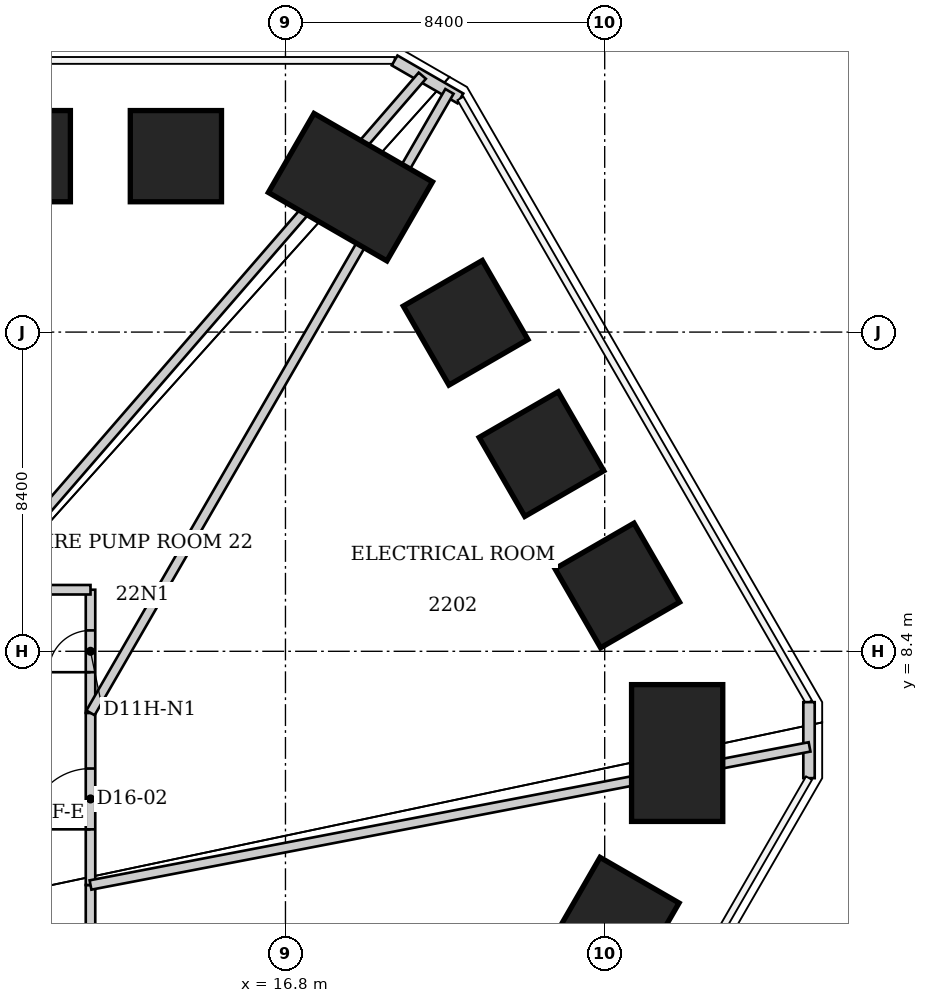
"""IFC4 building model, lengths in metres.
Left out: names, types, materials, properties, quantities, classifications, styles, units other than length and angle.
Written with IfcOpenShell. Run it as: python <this file> out.ifc"""

import sys

from ifc_helpers import new_model, si_unit, direction, frame, frame_2d, origin, origin_2d, place, context, subcontext, project, spatial, rectangle, extrude, element, fill, save


model = new_model("IFC4")
c1 = context("Model", 3, precision=1e-05, world=origin(), true_north=direction((0.0, 1.0)))
c2 = subcontext(c1, "Body", "Model", "MODEL_VIEW")
j1 = project(units=[si_unit("LENGTHUNIT", "METRE"), si_unit("PLANEANGLEUNIT", "RADIAN")], contexts=[c1])
p1 = place(None, origin())
s1 = spatial("IfcSite", under=j1, at=p1, CompositionType="ELEMENT")
p2 = place(p1, origin())
s2 = spatial("IfcBuilding", under=s1, at=p2, CompositionType="ELEMENT")
p3 = place(p2, frame((0.0, 0.0, 91.4)))
s3 = spatial("IfcBuildingStorey", under=s2, at=p3, CompositionType="ELEMENT", Elevation=91.4)
p4 = place(p3, frame((9.941, 21.43, 0.0), z_axis=(-0.017053044126, -0.036712049419, 0.999180373663), x_axis=(-0.000107778758, 0.999325751027, 0.036715551434)))
e1 = element("IfcColumn", 1, at=p4, inside=s3, PredefinedType="COLUMN", context=c2, shape_type="SweptSolid", body=[
    extrude(rectangle(XDim=2.4, YDim=2.4, at=origin_2d()), origin(), (0.0, 0.0, 1.0), 5.34),
])
p5 = place(p3, frame((13.917, 21.429, 0.0), z_axis=(-0.023853224026, -0.036672615058, 0.999042613209), x_axis=(-0.000167266676, 0.999327082748, 0.036679063624)))
e2 = element("IfcColumn", 2, at=p5, inside=s3, PredefinedType="COLUMN", context=c2, shape_type="SweptSolid", body=[
    extrude(rectangle(XDim=2.4, YDim=2.4, at=origin_2d()), origin(), (0.0, 0.0, 1.0), 5.333),
])
p6 = place(p3, frame((18.51, 20.614, 0.0), z_axis=(-0.031958260151, -0.035575312517, 0.998855878867), x_axis=(0.499237083594, 0.865201253746, 0.046788084823)))
e3 = element("IfcColumn", 3, at=p6, inside=s3, PredefinedType="COLUMN", context=c2, shape_type="SweptSolid", body=[
    extrude(rectangle(XDim=2.4, YDim=3.6, at=origin_2d()), origin(), (0.0, 0.0, 1.0), 5.332),
])
p7 = place(p3, frame((21.541, 17.045, 0.0), z_axis=(-0.036328704694, -0.028788784852, 0.998925137877), x_axis=(0.864915731471, 0.499817631807, 0.045859703319)))
e4 = element("IfcColumn", 4, at=p7, inside=s3, PredefinedType="COLUMN", context=c2, shape_type="SweptSolid", body=[
    extrude(rectangle(XDim=2.4, YDim=2.4, at=origin_2d()), origin(), (0.0, 0.0, 1.0), 5.343),
])
p8 = place(p3, frame((23.537, 13.589, 0.0), z_axis=(-0.039742486504, -0.022951171885, 0.998946334132), x_axis=(0.86505788595, 0.499568446192, 0.045893589143)))
e5 = element("IfcColumn", 5, at=p8, inside=s3, PredefinedType="COLUMN", context=c2, shape_type="SweptSolid", body=[
    extrude(rectangle(XDim=2.4, YDim=2.4, at=origin_2d()), origin(), (0.0, 0.0, 1.0), 5.351),
])
p9 = place(p3, frame((25.532, 10.132, 0.0), z_axis=(-0.043137386798, -0.017090447735, 0.998922961222), x_axis=(0.865241244978, 0.499249655961, 0.045906089048)))
e6 = element("IfcColumn", 6, at=p9, inside=s3, PredefinedType="COLUMN", context=c2, shape_type="SweptSolid", body=[
    extrude(rectangle(XDim=2.4, YDim=2.4, at=origin_2d()), origin(), (0.0, 0.0, 1.0), 5.343),
])
p10 = place(p3, frame((27.107, 5.723, 0.0), z_axis=(-0.046838428315, -0.009889638823, 0.998853521132), x_axis=(0.99890247848, -0.000452744235, 0.046836241416)))
e7 = element("IfcColumn", 7, at=p10, inside=s3, PredefinedType="COLUMN", context=c2, shape_type="SweptSolid", body=[
    extrude(rectangle(XDim=2.4, YDim=3.6, at=origin_2d()), origin(), (0.0, 0.0, 1.0), 5.332),
])
p11 = place(p3, frame((25.517, 1.338, 0.0), z_axis=(-0.043723212167, -0.002289173412, 0.999041060419), x_axis=(0.864969947422, -0.500479225702, 0.036708782297)))
e8 = element("IfcColumn", 8, at=p11, inside=s3, PredefinedType="COLUMN", context=c2, shape_type="SweptSolid", body=[
    extrude(rectangle(XDim=2.4, YDim=2.4, at=origin_2d()), origin(), (0.0, 0.0, 1.0), 5.333),
])
for number, where, z_axis, x_axis in (
    (9, (19.672, 23.949, 0.0), (0.0, 0.0, 1.0), (0.866, -0.5, 0.0)),
    (10, (30.576, 7.062, 0.0), (0.0, 0.0, 1.0), (0.0, -1.0, 0.0)),
):
    element("IfcWall", number, at=place(p3, frame(where, z_axis=z_axis, x_axis=x_axis)), inside=s3, PredefinedType="SOLIDWALL", context=c2, shape_type="SweptSolid", body=[
        extrude(rectangle(XDim=2.0, YDim=0.3, at=frame_2d((1.0, 0.0))), origin(), (0.0, 0.0, 1.0), 5.24),
    ])
p12 = place(p3, frame((11.67, -13.12, 0.0), z_axis=(0.0, 0.0, 1.0), x_axis=(0.0, 1.0, 0.0)))
e11 = element("IfcWall", 11, at=p12, inside=s3, PredefinedType="PARTITIONING", context=c2, shape_type="SweptSolid", body=[
    extrude(rectangle(XDim=15.37, YDim=0.25, at=frame_2d((7.685, 0.0))), origin(), (0.0, 0.0, 1.0), 5.24),
])
p13 = place(p12, frame((6.885, 0.0, 0.0)))
e12 = element("IfcOpeningElement", 12, at=p13, cuts=e11, PredefinedType="OPENING", context=c2, shape_type="SweptSolid", body=[
    extrude(rectangle(XDim=1.6, YDim=2.4, at=frame_2d((0.8, 1.2))), frame((0.0, 0.125, 0.0), z_axis=(0.0, -1.0, 0.0), x_axis=(1.0, 0.0, 0.0)), (0.0, 0.0, 1.0), 0.25),
])
p14 = place(p3, frame((11.67, 2.25, 0.0), z_axis=(0.0, 0.0, 1.0), x_axis=(0.0, 1.0, 0.0)))
e13 = element("IfcWall", 13, at=p14, inside=s3, PredefinedType="PARTITIONING", context=c2, shape_type="SweptSolid", body=[
    extrude(rectangle(XDim=4.53, YDim=0.25, at=frame_2d((2.265, 0.0))), origin(), (0.0, 0.0, 1.0), 5.24),
])
p15 = place(p14, frame((1.465, 0.0, 0.0)))
e14 = element("IfcOpeningElement", 14, at=p15, cuts=e13, PredefinedType="OPENING", context=c2, shape_type="SweptSolid", body=[
    extrude(rectangle(XDim=1.6, YDim=2.4, at=frame_2d((0.8, 1.2))), frame((0.0, 0.125, 0.0), z_axis=(0.0, -1.0, 0.0), x_axis=(1.0, 0.0, 0.0)), (0.0, 0.0, 1.0), 0.25),
])
p16 = place(p3, frame((11.67, 6.78, 0.0), z_axis=(0.0, 0.0, 1.0), x_axis=(0.0, 1.0, 0.0)))
e15 = element("IfcWall", 15, at=p16, inside=s3, PredefinedType="PARTITIONING", context=c2, shape_type="SweptSolid", body=[
    extrude(rectangle(XDim=3.24, YDim=0.25, at=frame_2d((1.62, 0.0))), origin(), (0.0, 0.0, 1.0), 5.24),
])
p17 = place(p16, frame((1.07, 0.0, 0.0)))
e16 = element("IfcOpeningElement", 16, at=p17, cuts=e15, PredefinedType="OPENING", context=c2, shape_type="SweptSolid", body=[
    extrude(rectangle(XDim=1.1, YDim=2.2, at=frame_2d((0.55, 1.1))), frame((0.0, 0.125, 0.0), z_axis=(0.0, -1.0, 0.0), x_axis=(1.0, 0.0, 0.0)), (0.0, 0.0, 1.0), 0.25),
])
p18 = place(p3, frame((11.67, 6.78, 0.0), z_axis=(0.0, 0.0, 1.0), x_axis=(0.500122303093, 0.865954780545, 0.0)))
e17 = element("IfcWall", 17, at=p18, inside=s3, PredefinedType="PARTITIONING", context=c2, shape_type="SweptSolid", body=[
    extrude(rectangle(XDim=18.885, YDim=0.25, at=frame_2d((9.443, 0.0))), origin(), (0.0, 0.0, 1.0), 5.2),
])
p19 = place(p3, frame((11.67, 10.02, 0.0), z_axis=(0.0, 0.0, 1.0), x_axis=(-1.0, 0.0, 0.0)))
e18 = element("IfcWall", 18, at=p19, inside=s3, PredefinedType="PARTITIONING", context=c2, shape_type="SweptSolid", body=[
    extrude(rectangle(XDim=2.99, YDim=0.25, at=frame_2d((1.495, 0.0))), origin(), (0.0, 0.0, 1.0), 5.24),
])
p20 = place(p3, frame((20.4, 23.547, 0.0), z_axis=(0.0, 0.0, 1.0), x_axis=(-0.654827191867, -0.755778637427, 0.0)))
e19 = element("IfcWall", 19, at=p20, inside=s3, PredefinedType="PARTITIONING", context=c2, shape_type="SweptSolid", body=[
    extrude(rectangle(XDim=17.898, YDim=0.25, at=frame_2d((8.949, 0.0))), origin(), (0.0, 0.0, 1.0), 5.2),
])
p21 = place(p3, frame((30.591, 5.884, 0.0), z_axis=(0.0, 0.0, 1.0), x_axis=(-0.982047909255, -0.188631662049, 0.0)))
e20 = element("IfcWall", 20, at=p21, inside=s3, PredefinedType="PARTITIONING", context=c2, shape_type="SweptSolid", body=[
    extrude(rectangle(XDim=19.267, YDim=0.25, at=frame_2d((9.633, 0.0))), origin(), (0.0, 0.0, 1.0), 4.275),
])
p22 = place(p15, origin())
e21 = element("IfcDoor", 21, at=p22, inside=s3, OperationType="DOUBLE_DOOR_SINGLE_SWING", PredefinedType="DOOR", context=c2, shape_type="SweptSolid", body=[
    extrude(rectangle(XDim=1.6, YDim=2.4, at=frame_2d((0.8, 1.2))), frame((0.0, 0.025, 0.0), z_axis=(0.0, -1.0, 0.0), x_axis=(1.0, 0.0, 0.0)), (0.0, 0.0, 1.0), 0.05),
])
fill(e14, e21)
p23 = place(p17, origin())
e22 = element("IfcDoor", 22, at=p23, inside=s3, OperationType="SINGLE_SWING_LEFT", PredefinedType="DOOR", context=c2, shape_type="SweptSolid", body=[
    extrude(rectangle(XDim=1.1, YDim=2.2, at=frame_2d((0.55, 1.1))), frame((0.0, 0.025, 0.0), z_axis=(0.0, -1.0, 0.0), x_axis=(1.0, 0.0, 0.0)), (0.0, 0.0, 1.0), 0.05),
])
fill(e16, e22)
save(model, sys.argv[1])
